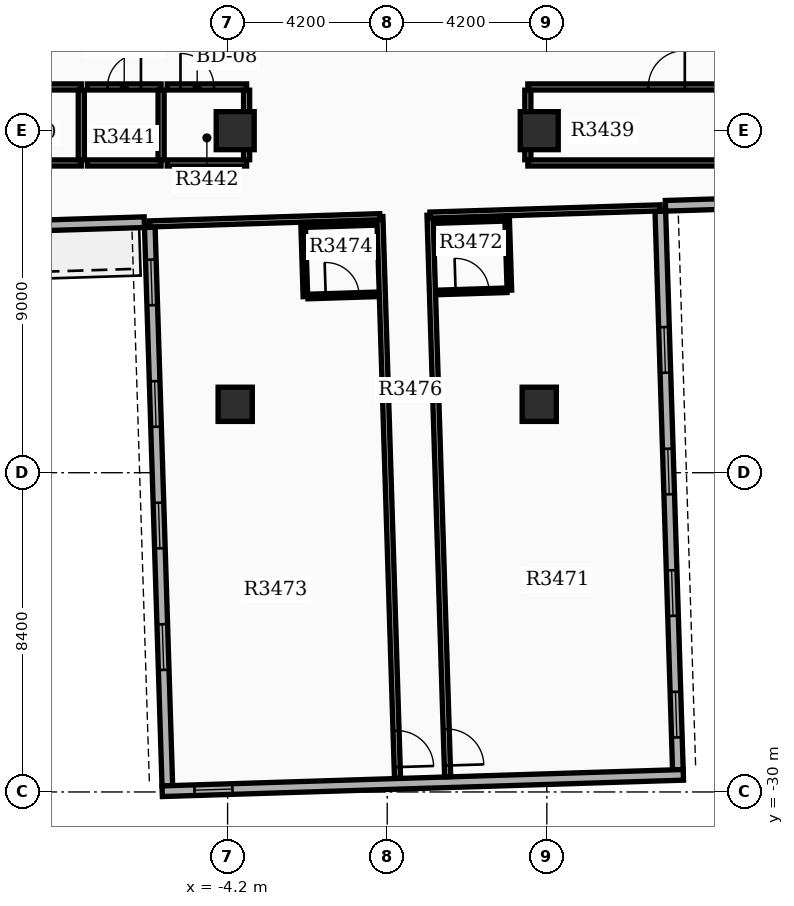
"""IFC4 building model, lengths in metres.
Left out: names, types, materials, properties, quantities, classifications, styles, units other than length and angle.
Written with IfcOpenShell. Run it as: python <this file> out.ifc"""

import sys

from ifc_helpers import new_model, si_unit, direction, frame, frame_2d, origin, origin_2d, place, context, subcontext, project, spatial, rectangle, extrude, element, fill, save


model = new_model("IFC4")
c1 = context("Model", 3, precision=1e-05, world=origin(), true_north=direction((0.0, 1.0)))
c2 = subcontext(c1, "Body", "Model", "MODEL_VIEW")
j1 = project(units=[si_unit("LENGTHUNIT", "METRE"), si_unit("PLANEANGLEUNIT", "RADIAN")], contexts=[c1])
p1 = place(None, origin())
s1 = spatial("IfcSite", under=j1, at=p1, CompositionType="ELEMENT")
p2 = place(p1, origin())
s2 = spatial("IfcBuilding", under=s1, at=p2, CompositionType="ELEMENT")
p3 = place(p2, frame((0.0, 0.0, 216.9)))
s3 = spatial("IfcBuildingStorey", under=s2, at=p3, CompositionType="ELEMENT", Elevation=216.9)
for number, where, z_axis, x_axis in (
    (1, (-4.0, -12.6, 0.0), (0.0, 0.0, 1.0), (1.0, 0.0, 0.0)),
    (2, (4.0, -12.6, 0.0), (0.0, 0.0, 1.0), (1.0, 0.0, 0.0)),
):
    element("IfcColumn", number, at=place(p3, frame(where, z_axis=z_axis, x_axis=x_axis)), inside=s3, PredefinedType="COLUMN", context=c2, shape_type="SweptSolid", body=[
        extrude(rectangle(XDim=1.0, YDim=1.0, at=origin_2d()), origin(), (0.0, 0.0, 1.0), 3.9),
    ])
for number, where, z_axis, x_axis in (
    (3, (-4.0, -19.8, 0.0), (0.0, 0.0, 1.0), (1.0, 0.0, 0.0)),
    (4, (4.0, -19.8, 0.0), (0.0, 0.0, 1.0), (1.0, 0.0, 0.0)),
):
    element("IfcColumn", number, at=place(p3, frame(where, z_axis=z_axis, x_axis=x_axis)), inside=s3, PredefinedType="COLUMN", context=c2, shape_type="SweptSolid", body=[
        extrude(rectangle(XDim=0.9, YDim=0.9, at=origin_2d()), origin(), (0.0, 0.0, 1.0), 3.9),
    ])
p4 = place(p3, frame((-6.247, -15.144, 0.0), z_axis=(0.0, 0.0, 1.0), x_axis=(0.031406376864, -0.999506698073, 0.0)))
e5 = element("IfcWall", 5, at=p4, inside=s3, PredefinedType="STANDARD", context=c2, shape_type="SweptSolid", body=[
    extrude(rectangle(XDim=14.7, YDim=0.28, at=frame_2d((7.35, 0.0))), origin(), (0.0, 0.0, 1.0), 3.18),
])
p5 = place(p4, frame((0.85, 0.0, 0.8)))
e6 = element("IfcOpeningElement", 6, at=p5, cuts=e5, PredefinedType="OPENING", context=c2, shape_type="SweptSolid", body=[
    extrude(rectangle(XDim=1.2, YDim=1.6, at=frame_2d((0.6, 0.8))), frame((0.0, 0.15, 0.0), z_axis=(0.0, -1.0, 0.0), x_axis=(1.0, 0.0, 0.0)), (0.0, 0.0, 1.0), 0.3),
])
p6 = place(p4, frame((4.05, 0.0, 0.8)))
e7 = element("IfcOpeningElement", 7, at=p6, cuts=e5, PredefinedType="OPENING", context=c2, shape_type="SweptSolid", body=[
    extrude(rectangle(XDim=1.2, YDim=1.6, at=frame_2d((0.6, 0.8))), frame((0.0, 0.15, 0.0), z_axis=(0.0, -1.0, 0.0), x_axis=(1.0, 0.0, 0.0)), (0.0, 0.0, 1.0), 0.3),
])
p7 = place(p4, frame((7.25, 0.0, 0.8)))
e8 = element("IfcOpeningElement", 8, at=p7, cuts=e5, PredefinedType="OPENING", context=c2, shape_type="SweptSolid", body=[
    extrude(rectangle(XDim=1.2, YDim=1.6, at=frame_2d((0.6, 0.8))), frame((0.0, 0.15, 0.0), z_axis=(0.0, -1.0, 0.0), x_axis=(1.0, 0.0, 0.0)), (0.0, 0.0, 1.0), 0.3),
])
p8 = place(p4, frame((10.45, 0.0, 0.8)))
e9 = element("IfcOpeningElement", 9, at=p8, cuts=e5, PredefinedType="OPENING", context=c2, shape_type="SweptSolid", body=[
    extrude(rectangle(XDim=1.2, YDim=1.6, at=frame_2d((0.6, 0.8))), frame((0.0, 0.15, 0.0), z_axis=(0.0, -1.0, 0.0), x_axis=(1.0, 0.0, 0.0)), (0.0, 0.0, 1.0), 0.3),
])
p9 = place(p3, frame((7.648, -29.414, 0.0), z_axis=(0.0, 0.0, 1.0), x_axis=(-0.031405855522, 0.999506714454, 0.0)))
e10 = element("IfcWall", 10, at=p9, inside=s3, PredefinedType="STANDARD", context=c2, shape_type="SweptSolid", body=[
    extrude(rectangle(XDim=14.7, YDim=0.28, at=frame_2d((7.35, 0.0))), origin(), (0.0, 0.0, 1.0), 3.18),
])
p10 = place(p9, frame((0.85, 0.0, 0.8)))
e11 = element("IfcOpeningElement", 11, at=p10, cuts=e10, PredefinedType="OPENING", context=c2, shape_type="SweptSolid", body=[
    extrude(rectangle(XDim=1.2, YDim=1.6, at=frame_2d((0.6, 0.8))), frame((0.0, 0.15, 0.0), z_axis=(0.0, -1.0, 0.0), x_axis=(1.0, 0.0, 0.0)), (0.0, 0.0, 1.0), 0.3),
])
p11 = place(p9, frame((4.05, 0.0, 0.8)))
e12 = element("IfcOpeningElement", 12, at=p11, cuts=e10, PredefinedType="OPENING", context=c2, shape_type="SweptSolid", body=[
    extrude(rectangle(XDim=1.2, YDim=1.6, at=frame_2d((0.6, 0.8))), frame((0.0, 0.15, 0.0), z_axis=(0.0, -1.0, 0.0), x_axis=(1.0, 0.0, 0.0)), (0.0, 0.0, 1.0), 0.3),
])
p12 = place(p9, frame((7.25, 0.0, 0.8)))
e13 = element("IfcOpeningElement", 13, at=p12, cuts=e10, PredefinedType="OPENING", context=c2, shape_type="SweptSolid", body=[
    extrude(rectangle(XDim=1.2, YDim=1.6, at=frame_2d((0.6, 0.8))), frame((0.0, 0.15, 0.0), z_axis=(0.0, -1.0, 0.0), x_axis=(1.0, 0.0, 0.0)), (0.0, 0.0, 1.0), 0.3),
])
p13 = place(p9, frame((10.45, 0.0, 0.8)))
e14 = element("IfcOpeningElement", 14, at=p13, cuts=e10, PredefinedType="OPENING", context=c2, shape_type="SweptSolid", body=[
    extrude(rectangle(XDim=1.2, YDim=1.6, at=frame_2d((0.6, 0.8))), frame((0.0, 0.15, 0.0), z_axis=(0.0, -1.0, 0.0), x_axis=(1.0, 0.0, 0.0)), (0.0, 0.0, 1.0), 0.3),
])
p14 = place(p3, frame((-5.921, -29.981, 0.0), z_axis=(0.0, 0.0, 1.0), x_axis=(0.999506662003, 0.031407524763, 0.0)))
e15 = element("IfcWall", 15, at=p14, inside=s3, PredefinedType="STANDARD", context=c2, shape_type="SweptSolid", body=[
    extrude(rectangle(XDim=13.72, YDim=0.28, at=frame_2d((6.86, 0.0))), origin(), (0.0, 0.0, 1.0), 3.18),
])
p15 = place(p14, frame((0.85, 0.0, 0.85)))
e16 = element("IfcOpeningElement", 16, at=p15, cuts=e15, PredefinedType="OPENING", context=c2, shape_type="SweptSolid", body=[
    extrude(rectangle(XDim=1.0, YDim=1.5, at=frame_2d((0.5, 0.75))), frame((0.0, 0.15, 0.0), z_axis=(0.0, -1.0, 0.0), x_axis=(1.0, 0.0, 0.0)), (0.0, 0.0, 1.0), 0.3),
])
p16 = place(p3, frame((-12.689, -15.206, 0.0), z_axis=(0.0, 0.0, 1.0), x_axis=(0.999507262922, 0.031388395416, 0.0)))
e17 = element("IfcWall", 17, at=p16, inside=s3, PredefinedType="STANDARD", context=c2, shape_type="SweptSolid", body=[
    extrude(rectangle(XDim=6.3, YDim=0.28, at=frame_2d((3.15, 0.0))), origin(), (0.0, 0.0, 1.0), 3.18),
])
p17 = place(p3, frame((13.618, -14.379, 0.0), z_axis=(0.0, 0.0, 1.0), x_axis=(-0.999507224741, -0.031389611199, 0.0)))
e18 = element("IfcWall", 18, at=p17, inside=s3, PredefinedType="STANDARD", context=c2, shape_type="SweptSolid", body=[
    extrude(rectangle(XDim=6.3, YDim=0.28, at=frame_2d((3.15, 0.0))), origin(), (0.0, 0.0, 1.0), 3.18),
])
p18 = place(p3, frame((3.7, -13.45, 0.0), z_axis=(0.0, 0.0, 1.0), x_axis=(1.0, 0.0, 0.0)))
e19 = element("IfcWall", 19, at=p18, inside=s3, PredefinedType="PARTITIONING", context=c2, shape_type="SweptSolid", body=[
    extrude(rectangle(XDim=7.3, YDim=0.16, at=frame_2d((3.65, 0.0))), origin(), (0.0, 0.0, 1.0), 3.17),
])
p19 = place(p3, frame((3.7, -11.45, 0.0), z_axis=(0.0, 0.0, 1.0), x_axis=(1.0, 0.0, 0.0)))
e20 = element("IfcWall", 20, at=p19, inside=s3, PredefinedType="PARTITIONING", context=c2, shape_type="SweptSolid", body=[
    extrude(rectangle(XDim=7.3, YDim=0.16, at=frame_2d((3.65, 0.0))), origin(), (0.0, 0.0, 1.0), 3.17),
])
p20 = place(p19, frame((3.17, 0.0, 0.0)))
e21 = element("IfcOpeningElement", 21, at=p20, cuts=e20, PredefinedType="OPENING", context=c2, shape_type="SweptSolid", body=[
    extrude(rectangle(XDim=0.96, YDim=2.15, at=frame_2d((0.48, 1.075))), frame((0.0, 0.09, 0.0), z_axis=(0.0, -1.0, 0.0), x_axis=(1.0, 0.0, 0.0)), (0.0, 0.0, 1.0), 0.18),
])
p21 = place(p3, frame((3.7, -13.365, 0.0), z_axis=(0.0, 0.0, 1.0), x_axis=(0.0, 1.0, 0.0)))
e22 = element("IfcWall", 22, at=p21, inside=s3, PredefinedType="PARTITIONING", context=c2, shape_type="SweptSolid", body=[
    extrude(rectangle(XDim=1.83, YDim=0.16, at=frame_2d((0.915, 0.0))), origin(), (0.0, 0.0, 1.0), 3.17),
])
p22 = place(p3, frame((-11.0, -13.45, 0.0), z_axis=(0.0, 0.0, 1.0), x_axis=(1.0, 0.0, 0.0)))
e23 = element("IfcWall", 23, at=p22, inside=s3, PredefinedType="PARTITIONING", context=c2, shape_type="SweptSolid", body=[
    extrude(rectangle(XDim=2.95, YDim=0.16, at=frame_2d((1.475, 0.0))), origin(), (0.0, 0.0, 1.0), 3.17),
])
p23 = place(p3, frame((-11.0, -11.45, 0.0), z_axis=(0.0, 0.0, 1.0), x_axis=(1.0, 0.0, 0.0)))
e24 = element("IfcWall", 24, at=p23, inside=s3, PredefinedType="PARTITIONING", context=c2, shape_type="SweptSolid", body=[
    extrude(rectangle(XDim=2.95, YDim=0.16, at=frame_2d((1.475, 0.0))), origin(), (0.0, 0.0, 1.0), 3.17),
])
p24 = place(p23, frame((0.995, 0.0, 0.0)))
e25 = element("IfcOpeningElement", 25, at=p24, cuts=e24, PredefinedType="OPENING", context=c2, shape_type="SweptSolid", body=[
    extrude(rectangle(XDim=0.96, YDim=2.15, at=frame_2d((0.48, 1.075))), frame((0.0, 0.09, 0.0), z_axis=(0.0, -1.0, 0.0), x_axis=(1.0, 0.0, 0.0)), (0.0, 0.0, 1.0), 0.18),
])
p25 = place(p3, frame((-8.05, -13.365, 0.0), z_axis=(0.0, 0.0, 1.0), x_axis=(0.0, 1.0, 0.0)))
e26 = element("IfcWall", 26, at=p25, inside=s3, PredefinedType="PARTITIONING", context=c2, shape_type="SweptSolid", body=[
    extrude(rectangle(XDim=1.83, YDim=0.16, at=frame_2d((0.915, 0.0))), origin(), (0.0, 0.0, 1.0), 3.17),
])
p26 = place(p3, frame((-7.89, -13.45, 0.0), z_axis=(0.0, 0.0, 1.0), x_axis=(1.0, 0.0, 0.0)))
e27 = element("IfcWall", 27, at=p26, inside=s3, PredefinedType="PARTITIONING", context=c2, shape_type="SweptSolid", body=[
    extrude(rectangle(XDim=1.94, YDim=0.16, at=frame_2d((0.97, 0.0))), origin(), (0.0, 0.0, 1.0), 3.17),
])
p27 = place(p3, frame((-7.89, -11.45, 0.0), z_axis=(0.0, 0.0, 1.0), x_axis=(1.0, 0.0, 0.0)))
e28 = element("IfcWall", 28, at=p27, inside=s3, PredefinedType="PARTITIONING", context=c2, shape_type="SweptSolid", body=[
    extrude(rectangle(XDim=1.94, YDim=0.16, at=frame_2d((0.97, 0.0))), origin(), (0.0, 0.0, 1.0), 3.17),
])
p28 = place(p27, frame((0.53, 0.0, 0.0)))
e29 = element("IfcOpeningElement", 29, at=p28, cuts=e28, PredefinedType="OPENING", context=c2, shape_type="SweptSolid", body=[
    extrude(rectangle(XDim=0.88, YDim=2.1, at=frame_2d((0.44, 1.05))), frame((0.0, 0.09, 0.0), z_axis=(0.0, -1.0, 0.0), x_axis=(1.0, 0.0, 0.0)), (0.0, 0.0, 1.0), 0.18),
])
p29 = place(p3, frame((-5.95, -13.365, 0.0), z_axis=(0.0, 0.0, 1.0), x_axis=(0.0, 1.0, 0.0)))
e30 = element("IfcWall", 30, at=p29, inside=s3, PredefinedType="PARTITIONING", context=c2, shape_type="SweptSolid", body=[
    extrude(rectangle(XDim=1.83, YDim=0.16, at=frame_2d((0.915, 0.0))), origin(), (0.0, 0.0, 1.0), 3.17),
])
p30 = place(p3, frame((-5.79, -13.45, 0.0), z_axis=(0.0, 0.0, 1.0), x_axis=(1.0, 0.0, 0.0)))
e31 = element("IfcWall", 31, at=p30, inside=s3, PredefinedType="PARTITIONING", context=c2, shape_type="SweptSolid", body=[
    extrude(rectangle(XDim=2.09, YDim=0.16, at=frame_2d((1.045, 0.0))), origin(), (0.0, 0.0, 1.0), 3.17),
])
p31 = place(p3, frame((-5.79, -11.45, 0.0), z_axis=(0.0, 0.0, 1.0), x_axis=(1.0, 0.0, 0.0)))
e32 = element("IfcWall", 32, at=p31, inside=s3, PredefinedType="PARTITIONING", context=c2, shape_type="SweptSolid", body=[
    extrude(rectangle(XDim=2.09, YDim=0.16, at=frame_2d((1.045, 0.0))), origin(), (0.0, 0.0, 1.0), 3.17),
])
p32 = place(p31, frame((0.35, 0.0, 0.0)))
e33 = element("IfcOpeningElement", 33, at=p32, cuts=e32, PredefinedType="OPENING", context=c2, shape_type="SweptSolid", body=[
    extrude(rectangle(XDim=0.88, YDim=2.15, at=frame_2d((0.44, 1.075))), frame((0.0, 0.09, 0.0), z_axis=(0.0, -1.0, 0.0), x_axis=(1.0, 0.0, 0.0)), (0.0, 0.0, 1.0), 0.18),
])
p33 = place(p3, frame((-3.7, -13.365, 0.0), z_axis=(0.0, 0.0, 1.0), x_axis=(0.0, 1.0, 0.0)))
e34 = element("IfcWall", 34, at=p33, inside=s3, PredefinedType="PARTITIONING", context=c2, shape_type="SweptSolid", body=[
    extrude(rectangle(XDim=1.83, YDim=0.16, at=frame_2d((0.915, 0.0))), origin(), (0.0, 0.0, 1.0), 3.17),
])
p34 = place(p3, frame((1.126, -14.822, 0.0), z_axis=(0.0, 0.0, 1.0), x_axis=(0.031397174061, -0.9995069872, 0.0)))
e35 = element("IfcWall", 35, at=p34, inside=s3, PredefinedType="PARTITIONING", context=c2, shape_type="SweptSolid", body=[
    extrude(rectangle(XDim=14.782, YDim=0.16, at=frame_2d((7.391, 0.0))), origin(), (0.0, 0.0, 1.0), 3.17),
])
p35 = place(p34, frame((13.53, 0.0, 0.0)))
e36 = element("IfcOpeningElement", 36, at=p35, cuts=e35, PredefinedType="OPENING", context=c2, shape_type="SweptSolid", body=[
    extrude(rectangle(XDim=0.96, YDim=2.15, at=frame_2d((0.48, 1.075))), frame((0.0, 0.09, 0.0), z_axis=(0.0, -1.0, 0.0), x_axis=(1.0, 0.0, 0.0)), (0.0, 0.0, 1.0), 0.18),
])
p36 = place(p3, frame((1.126, -14.822, 0.0), z_axis=(0.0, 0.0, 1.0), x_axis=(0.999506122926, 0.031424675557, 0.0)))
e37 = element("IfcWall", 37, at=p36, inside=s3, PredefinedType="PARTITIONING", context=c2, shape_type="SweptSolid", body=[
    extrude(rectangle(XDim=6.06, YDim=0.16, at=frame_2d((3.03, 0.0))), origin(), (0.0, 0.0, 1.0), 3.17),
])
p37 = place(p3, frame((1.33, -16.856, 0.0), z_axis=(0.0, 0.0, 1.0), x_axis=(0.999507221803, 0.031389704724, 0.0)))
e38 = element("IfcWall", 38, at=p37, inside=s3, PredefinedType="PARTITIONING", context=c2, shape_type="SweptSolid", body=[
    extrude(rectangle(XDim=1.82, YDim=0.12, at=frame_2d((0.91, 0.0))), origin(), (0.0, 0.0, 1.0), 3.17),
])
p38 = place(p37, frame((0.47, 0.0, 0.0)))
e39 = element("IfcOpeningElement", 39, at=p38, cuts=e38, PredefinedType="OPENING", context=c2, shape_type="SweptSolid", body=[
    extrude(rectangle(XDim=0.88, YDim=2.1, at=frame_2d((0.44, 1.05))), frame((0.0, 0.07, 0.0), z_axis=(0.0, -1.0, 0.0), x_axis=(1.0, 0.0, 0.0)), (0.0, 0.0, 1.0), 0.14),
])
p39 = place(p3, frame((1.271, -14.978, 0.0), z_axis=(0.0, 0.0, 1.0), x_axis=(0.999507221803, 0.031389704724, 0.0)))
e40 = element("IfcWall", 40, at=p39, inside=s3, PredefinedType="PARTITIONING", context=c2, shape_type="SweptSolid", body=[
    extrude(rectangle(XDim=1.82, YDim=0.12, at=frame_2d((0.91, 0.0))), origin(), (0.0, 0.0, 1.0), 3.17),
])
p40 = place(p3, frame((3.155, -14.918, 0.0), z_axis=(0.0, 0.0, 1.0), x_axis=(0.031295563454, -0.999510173889, 0.0)))
e41 = element("IfcWall", 41, at=p40, inside=s3, PredefinedType="PARTITIONING", context=c2, shape_type="SweptSolid", body=[
    extrude(rectangle(XDim=1.88, YDim=0.12, at=frame_2d((0.94, 0.0))), origin(), (0.0, 0.0, 1.0), 3.17),
])
p41 = place(p3, frame((-0.193, -14.863, 0.0), z_axis=(0.0, 0.0, 1.0), x_axis=(0.031396655766, -0.999507003481, 0.0)))
e42 = element("IfcWall", 42, at=p41, inside=s3, PredefinedType="PARTITIONING", context=c2, shape_type="SweptSolid", body=[
    extrude(rectangle(XDim=14.782, YDim=0.16, at=frame_2d((7.391, 0.0))), origin(), (0.0, 0.0, 1.0), 3.17),
])
p42 = place(p41, frame((13.53, 0.0, 0.0)))
e43 = element("IfcOpeningElement", 43, at=p42, cuts=e42, PredefinedType="OPENING", context=c2, shape_type="SweptSolid", body=[
    extrude(rectangle(XDim=0.96, YDim=2.15, at=frame_2d((0.48, 1.075))), frame((0.0, 0.09, 0.0), z_axis=(0.0, -1.0, 0.0), x_axis=(1.0, 0.0, 0.0)), (0.0, 0.0, 1.0), 0.18),
])
p43 = place(p3, frame((-0.193, -14.863, 0.0), z_axis=(0.0, 0.0, 1.0), x_axis=(-0.999506162708, -0.031423410194, 0.0)))
e44 = element("IfcWall", 44, at=p43, inside=s3, PredefinedType="PARTITIONING", context=c2, shape_type="SweptSolid", body=[
    extrude(rectangle(XDim=6.06, YDim=0.16, at=frame_2d((3.03, 0.0))), origin(), (0.0, 0.0, 1.0), 3.17),
])
p44 = place(p3, frame((-2.088, -16.964, 0.0), z_axis=(0.0, 0.0, 1.0), x_axis=(0.999503004171, 0.03152371574, 0.0)))
e45 = element("IfcWall", 45, at=p44, inside=s3, PredefinedType="PARTITIONING", context=c2, shape_type="SweptSolid", body=[
    extrude(rectangle(XDim=1.82, YDim=0.12, at=frame_2d((0.91, 0.0))), origin(), (0.0, 0.0, 1.0), 3.17),
])
p45 = place(p44, frame((0.47, 0.0, 0.0)))
e46 = element("IfcOpeningElement", 46, at=p45, cuts=e45, PredefinedType="OPENING", context=c2, shape_type="SweptSolid", body=[
    extrude(rectangle(XDim=0.88, YDim=2.1, at=frame_2d((0.44, 1.05))), frame((0.0, 0.07, 0.0), z_axis=(0.0, -1.0, 0.0), x_axis=(1.0, 0.0, 0.0)), (0.0, 0.0, 1.0), 0.14),
])
p46 = place(p3, frame((-2.147, -15.085, 0.0), z_axis=(0.0, 0.0, 1.0), x_axis=(0.999503004171, 0.03152371574, 0.0)))
e47 = element("IfcWall", 47, at=p46, inside=s3, PredefinedType="PARTITIONING", context=c2, shape_type="SweptSolid", body=[
    extrude(rectangle(XDim=1.82, YDim=0.12, at=frame_2d((0.91, 0.0))), origin(), (0.0, 0.0, 1.0), 3.17),
])
p47 = place(p3, frame((-2.212, -15.087, 0.0), z_axis=(0.0, 0.0, 1.0), x_axis=(0.031425292588, -0.999506103526, 0.0)))
e48 = element("IfcWall", 48, at=p47, inside=s3, PredefinedType="PARTITIONING", context=c2, shape_type="SweptSolid", body=[
    extrude(rectangle(XDim=1.88, YDim=0.12, at=frame_2d((0.94, 0.0))), origin(), (0.0, 0.0, 1.0), 3.17),
])
p48 = place(p5, origin())
e49 = element("IfcWindow", 49, at=p48, inside=s3, PartitioningType="SINGLE_PANEL", PredefinedType="WINDOW", context=c2, shape_type="SweptSolid", body=[
    extrude(rectangle(XDim=1.2, YDim=1.6, at=frame_2d((0.6, 0.8))), frame((0.0, 0.03, 0.0), z_axis=(0.0, -1.0, 0.0), x_axis=(1.0, 0.0, 0.0)), (0.0, 0.0, 1.0), 0.06),
])
fill(e6, e49)
p49 = place(p6, origin())
e50 = element("IfcWindow", 50, at=p49, inside=s3, PartitioningType="SINGLE_PANEL", PredefinedType="WINDOW", context=c2, shape_type="SweptSolid", body=[
    extrude(rectangle(XDim=1.2, YDim=1.6, at=frame_2d((0.6, 0.8))), frame((0.0, 0.03, 0.0), z_axis=(0.0, -1.0, 0.0), x_axis=(1.0, 0.0, 0.0)), (0.0, 0.0, 1.0), 0.06),
])
fill(e7, e50)
p50 = place(p7, origin())
e51 = element("IfcWindow", 51, at=p50, inside=s3, PartitioningType="SINGLE_PANEL", PredefinedType="WINDOW", context=c2, shape_type="SweptSolid", body=[
    extrude(rectangle(XDim=1.2, YDim=1.6, at=frame_2d((0.6, 0.8))), frame((0.0, 0.03, 0.0), z_axis=(0.0, -1.0, 0.0), x_axis=(1.0, 0.0, 0.0)), (0.0, 0.0, 1.0), 0.06),
])
fill(e8, e51)
p51 = place(p8, origin())
e52 = element("IfcWindow", 52, at=p51, inside=s3, PartitioningType="SINGLE_PANEL", PredefinedType="WINDOW", context=c2, shape_type="SweptSolid", body=[
    extrude(rectangle(XDim=1.2, YDim=1.6, at=frame_2d((0.6, 0.8))), frame((0.0, 0.03, 0.0), z_axis=(0.0, -1.0, 0.0), x_axis=(1.0, 0.0, 0.0)), (0.0, 0.0, 1.0), 0.06),
])
fill(e9, e52)
p52 = place(p10, origin())
e53 = element("IfcWindow", 53, at=p52, inside=s3, PartitioningType="SINGLE_PANEL", PredefinedType="WINDOW", context=c2, shape_type="SweptSolid", body=[
    extrude(rectangle(XDim=1.2, YDim=1.6, at=frame_2d((0.6, 0.8))), frame((0.0, 0.03, 0.0), z_axis=(0.0, -1.0, 0.0), x_axis=(1.0, 0.0, 0.0)), (0.0, 0.0, 1.0), 0.06),
])
fill(e11, e53)
p53 = place(p11, origin())
e54 = element("IfcWindow", 54, at=p53, inside=s3, PartitioningType="SINGLE_PANEL", PredefinedType="WINDOW", context=c2, shape_type="SweptSolid", body=[
    extrude(rectangle(XDim=1.2, YDim=1.6, at=frame_2d((0.6, 0.8))), frame((0.0, 0.03, 0.0), z_axis=(0.0, -1.0, 0.0), x_axis=(1.0, 0.0, 0.0)), (0.0, 0.0, 1.0), 0.06),
])
fill(e12, e54)
p54 = place(p12, origin())
e55 = element("IfcWindow", 55, at=p54, inside=s3, PartitioningType="SINGLE_PANEL", PredefinedType="WINDOW", context=c2, shape_type="SweptSolid", body=[
    extrude(rectangle(XDim=1.2, YDim=1.6, at=frame_2d((0.6, 0.8))), frame((0.0, 0.03, 0.0), z_axis=(0.0, -1.0, 0.0), x_axis=(1.0, 0.0, 0.0)), (0.0, 0.0, 1.0), 0.06),
])
fill(e13, e55)
p55 = place(p13, origin())
e56 = element("IfcWindow", 56, at=p55, inside=s3, PartitioningType="SINGLE_PANEL", PredefinedType="WINDOW", context=c2, shape_type="SweptSolid", body=[
    extrude(rectangle(XDim=1.2, YDim=1.6, at=frame_2d((0.6, 0.8))), frame((0.0, 0.03, 0.0), z_axis=(0.0, -1.0, 0.0), x_axis=(1.0, 0.0, 0.0)), (0.0, 0.0, 1.0), 0.06),
])
fill(e14, e56)
p56 = place(p15, origin())
e57 = element("IfcWindow", 57, at=p56, inside=s3, PartitioningType="SINGLE_PANEL", PredefinedType="WINDOW", context=c2, shape_type="SweptSolid", body=[
    extrude(rectangle(XDim=1.0, YDim=1.5, at=frame_2d((0.5, 0.75))), frame((0.0, 0.03, 0.0), z_axis=(0.0, -1.0, 0.0), x_axis=(1.0, 0.0, 0.0)), (0.0, 0.0, 1.0), 0.06),
])
fill(e16, e57)
p57 = place(p20, origin())
e58 = element("IfcDoor", 58, at=p57, inside=s3, OperationType="SINGLE_SWING_RIGHT", PredefinedType="DOOR", context=c2, shape_type="SweptSolid", body=[
    extrude(rectangle(XDim=0.96, YDim=2.15, at=frame_2d((0.48, 1.075))), frame((0.0, 0.025, 0.0), z_axis=(0.0, -1.0, 0.0), x_axis=(1.0, 0.0, 0.0)), (0.0, 0.0, 1.0), 0.05),
])
fill(e21, e58)
p58 = place(p28, origin())
e59 = element("IfcDoor", 59, at=p58, inside=s3, OperationType="SINGLE_SWING_RIGHT", PredefinedType="DOOR", context=c2, shape_type="SweptSolid", body=[
    extrude(rectangle(XDim=0.88, YDim=2.1, at=frame_2d((0.44, 1.05))), frame((0.0, 0.025, 0.0), z_axis=(0.0, -1.0, 0.0), x_axis=(1.0, 0.0, 0.0)), (0.0, 0.0, 1.0), 0.05),
])
fill(e29, e59)
p59 = place(p32, origin())
e60 = element("IfcDoor", 60, at=p59, inside=s3, OperationType="SINGLE_SWING_LEFT", PredefinedType="DOOR", context=c2, shape_type="SweptSolid", body=[
    extrude(rectangle(XDim=0.88, YDim=2.15, at=frame_2d((0.44, 1.075))), frame((0.0, 0.025, 0.0), z_axis=(0.0, -1.0, 0.0), x_axis=(1.0, 0.0, 0.0)), (0.0, 0.0, 1.0), 0.05),
])
fill(e33, e60)
p60 = place(p35, origin())
e61 = element("IfcDoor", 61, at=p60, inside=s3, OperationType="SINGLE_SWING_RIGHT", PredefinedType="DOOR", context=c2, shape_type="SweptSolid", body=[
    extrude(rectangle(XDim=0.96, YDim=2.15, at=frame_2d((0.48, 1.075))), frame((0.0, 0.025, 0.0), z_axis=(0.0, -1.0, 0.0), x_axis=(1.0, 0.0, 0.0)), (0.0, 0.0, 1.0), 0.05),
])
fill(e36, e61)
p61 = place(p38, origin())
e62 = element("IfcDoor", 62, at=p61, inside=s3, OperationType="SINGLE_SWING_LEFT", PredefinedType="DOOR", context=c2, shape_type="SweptSolid", body=[
    extrude(rectangle(XDim=0.88, YDim=2.1, at=frame_2d((0.44, 1.05))), frame((0.0, 0.025, 0.0), z_axis=(0.0, -1.0, 0.0), x_axis=(1.0, 0.0, 0.0)), (0.0, 0.0, 1.0), 0.05),
])
fill(e39, e62)
p62 = place(p42, origin())
e63 = element("IfcDoor", 63, at=p62, inside=s3, OperationType="SINGLE_SWING_RIGHT", PredefinedType="DOOR", context=c2, shape_type="SweptSolid", body=[
    extrude(rectangle(XDim=0.96, YDim=2.15, at=frame_2d((0.48, 1.075))), frame((0.0, 0.025, 0.0), z_axis=(0.0, -1.0, 0.0), x_axis=(1.0, 0.0, 0.0)), (0.0, 0.0, 1.0), 0.05),
])
fill(e43, e63)
p63 = place(p45, origin())
e64 = element("IfcDoor", 64, at=p63, inside=s3, OperationType="SINGLE_SWING_LEFT", PredefinedType="DOOR", context=c2, shape_type="SweptSolid", body=[
    extrude(rectangle(XDim=0.88, YDim=2.1, at=frame_2d((0.44, 1.05))), frame((0.0, 0.025, 0.0), z_axis=(0.0, -1.0, 0.0), x_axis=(1.0, 0.0, 0.0)), (0.0, 0.0, 1.0), 0.05),
])
fill(e46, e64)
save(model, sys.argv[1])
